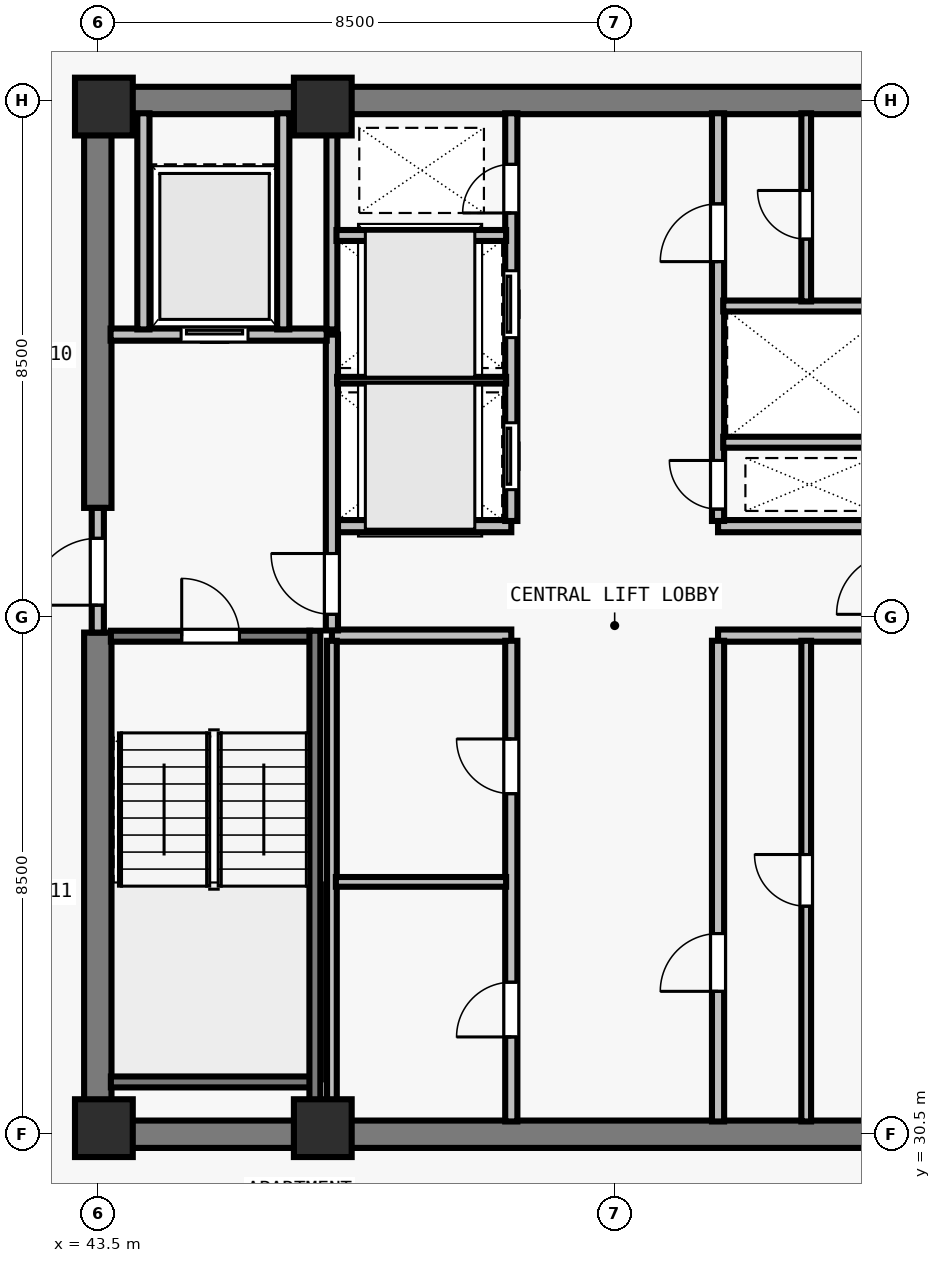
"""IFC4 building model, lengths in metres.
Left out: names, types, materials, properties, quantities, classifications, styles, units other than length and angle.
Written with IfcOpenShell. Run it as: python <this file> out.ifc"""

import sys

from ifc_helpers import new_model, si_unit, direction, frame, frame_2d, origin, origin_2d, place, context, subcontext, project, spatial, rectangle, extrude, element, fill, save


model = new_model("IFC4")
c1 = context("Model", 3, precision=1e-05, world=origin(), true_north=direction((0.0, 1.0)))
c2 = subcontext(c1, "Body", "Model", "MODEL_VIEW")
j1 = project(units=[si_unit("LENGTHUNIT", "METRE"), si_unit("PLANEANGLEUNIT", "RADIAN")], contexts=[c1])
p1 = place(None, origin())
s1 = spatial("IfcSite", under=j1, at=p1, CompositionType="ELEMENT")
p2 = place(p1, origin())
s2 = spatial("IfcBuilding", under=s1, at=p2, CompositionType="ELEMENT")
p3 = place(p2, frame((0.0, 0.0, 216.5)))
s3 = spatial("IfcBuildingStorey", under=s2, at=p3, CompositionType="ELEMENT", Elevation=216.5)
for number, where, z_axis, x_axis in (
    (1, (43.6, 30.6, 0.0), (0.0, 0.0, 1.0), (1.0, 0.0, 0.0)),
    (2, (47.2, 30.6, 0.0), (0.0, 0.0, 1.0), (1.0, 0.0, 0.0)),
    (3, (43.6, 47.4, 0.0), (0.0, 0.0, 1.0), (1.0, 0.0, 0.0)),
    (4, (47.2, 47.4, 0.0), (0.0, 0.0, 1.0), (1.0, 0.0, 0.0)),
):
    element("IfcColumn", number, at=place(p3, frame(where, z_axis=z_axis, x_axis=x_axis)), inside=s3, PredefinedType="COLUMN", context=c2, shape_type="SweptSolid", body=[
        extrude(rectangle(XDim=0.95, YDim=0.95, at=origin_2d()), origin(), (0.0, 0.0, 1.0), 3.5),
    ])
for number, where, z_axis, x_axis in (
    (5, (43.275, 30.5, 0.0), (0.0, 0.0, 1.0), (1.0, 0.0, 0.0)),
    (6, (43.275, 47.5, 0.0), (0.0, 0.0, 1.0), (1.0, 0.0, 0.0)),
):
    element("IfcWall", number, at=place(p3, frame(where, z_axis=z_axis, x_axis=x_axis)), inside=s3, PredefinedType="SHEAR", context=c2, shape_type="SweptSolid", body=[
        extrude(rectangle(XDim=17.45, YDim=0.45, at=frame_2d((8.725, 0.0))), origin(), (0.0, 0.0, 1.0), 3.29),
    ])
p4 = place(p3, frame((43.5, 30.715, 0.0), z_axis=(0.0, 0.0, 1.0), x_axis=(0.0, 1.0, 0.0)))
e7 = element("IfcWall", 7, at=p4, inside=s3, PredefinedType="SHEAR", context=c2, shape_type="SweptSolid", body=[
    extrude(rectangle(XDim=8.035, YDim=0.45, at=frame_2d((4.018, 0.0))), origin(), (0.0, 0.0, 1.0), 3.29),
])
p5 = place(p3, frame((43.5, 40.8, 0.0), z_axis=(0.0, 0.0, 1.0), x_axis=(0.0, 1.0, 0.0)))
e8 = element("IfcWall", 8, at=p5, inside=s3, PredefinedType="SHEAR", context=c2, shape_type="SweptSolid", body=[
    extrude(rectangle(XDim=6.485, YDim=0.45, at=frame_2d((3.242, 0.0))), origin(), (0.0, 0.0, 1.0), 3.29),
])
for number, where, z_axis, x_axis in (
    (9, (47.35, 38.7, 0.0), (0.0, 0.0, 1.0), (1.0, 0.0, 0.0)),
    (10, (47.35, 40.5, 0.0), (0.0, 0.0, 1.0), (1.0, 0.0, 0.0)),
    (11, (53.7, 38.7, 0.0), (0.0, 0.0, 1.0), (1.0, 0.0, 0.0)),
    (12, (53.7, 40.5, 0.0), (0.0, 0.0, 1.0), (1.0, 0.0, 0.0)),
):
    element("IfcWall", number, at=place(p3, frame(where, z_axis=z_axis, x_axis=x_axis)), inside=s3, PredefinedType="SOLIDWALL", context=c2, shape_type="SweptSolid", body=[
        extrude(rectangle(XDim=2.95, YDim=0.2, at=frame_2d((1.475, 0.0))), origin(), (0.0, 0.0, 1.0), 3.29),
    ])
p6 = place(p3, frame((50.3, 30.71, 0.0), z_axis=(0.0, 0.0, 1.0), x_axis=(0.0, 1.0, 0.0)))
e13 = element("IfcWall", 13, at=p6, inside=s3, PredefinedType="SOLIDWALL", context=c2, shape_type="SweptSolid", body=[
    extrude(rectangle(XDim=7.905, YDim=0.2, at=frame_2d((3.953, 0.0))), origin(), (0.0, 0.0, 1.0), 3.29),
])
p7 = place(p6, frame((1.39, 0.0, 0.0)))
e14 = element("IfcOpeningElement", 14, at=p7, cuts=e13, PredefinedType="OPENING", context=c2, shape_type="SweptSolid", body=[
    extrude(rectangle(XDim=0.9, YDim=2.12, at=frame_2d((0.45, 1.06))), frame((0.0, 0.11, 0.0), z_axis=(0.0, -1.0, 0.0), x_axis=(1.0, 0.0, 0.0)), (0.0, 0.0, 1.0), 0.22),
])
p8 = place(p6, frame((5.39, 0.0, 0.0)))
e15 = element("IfcOpeningElement", 15, at=p8, cuts=e13, PredefinedType="OPENING", context=c2, shape_type="SweptSolid", body=[
    extrude(rectangle(XDim=0.9, YDim=2.12, at=frame_2d((0.45, 1.06))), frame((0.0, 0.11, 0.0), z_axis=(0.0, -1.0, 0.0), x_axis=(1.0, 0.0, 0.0)), (0.0, 0.0, 1.0), 0.22),
])
p9 = place(p3, frame((53.7, 30.71, 0.0), z_axis=(0.0, 0.0, 1.0), x_axis=(0.0, 1.0, 0.0)))
e16 = element("IfcWall", 16, at=p9, inside=s3, PredefinedType="SOLIDWALL", context=c2, shape_type="SweptSolid", body=[
    extrude(rectangle(XDim=7.905, YDim=0.2, at=frame_2d((3.953, 0.0))), origin(), (0.0, 0.0, 1.0), 3.29),
])
p10 = place(p9, frame((2.14, 0.0, 0.0)))
e17 = element("IfcOpeningElement", 17, at=p10, cuts=e16, PredefinedType="OPENING", context=c2, shape_type="SweptSolid", body=[
    extrude(rectangle(XDim=0.95, YDim=2.12, at=frame_2d((0.475, 1.06))), frame((0.0, 0.11, 0.0), z_axis=(0.0, -1.0, 0.0), x_axis=(1.0, 0.0, 0.0)), (0.0, 0.0, 1.0), 0.22),
])
p11 = place(p3, frame((50.3, 40.585, 0.0), z_axis=(0.0, 0.0, 1.0), x_axis=(0.0, 1.0, 0.0)))
e18 = element("IfcWall", 18, at=p11, inside=s3, PredefinedType="SOLIDWALL", context=c2, shape_type="SweptSolid", body=[
    extrude(rectangle(XDim=6.705, YDim=0.2, at=frame_2d((3.353, 0.0))), origin(), (0.0, 0.0, 1.0), 3.29),
])
p12 = place(p11, frame((0.515, 0.0, 0.0)))
e19 = element("IfcOpeningElement", 19, at=p12, cuts=e18, PredefinedType="OPENING", context=c2, shape_type="SweptSolid", body=[
    extrude(rectangle(XDim=1.1, YDim=2.2, at=frame_2d((0.55, 1.1))), frame((0.0, 0.11, 0.0), z_axis=(0.0, -1.0, 0.0), x_axis=(1.0, 0.0, 0.0)), (0.0, 0.0, 1.0), 0.22),
])
p13 = place(p11, frame((3.015, 0.0, 0.0)))
e20 = element("IfcOpeningElement", 20, at=p13, cuts=e18, PredefinedType="OPENING", context=c2, shape_type="SweptSolid", body=[
    extrude(rectangle(XDim=1.1, YDim=2.2, at=frame_2d((0.55, 1.1))), frame((0.0, 0.11, 0.0), z_axis=(0.0, -1.0, 0.0), x_axis=(1.0, 0.0, 0.0)), (0.0, 0.0, 1.0), 0.22),
])
p14 = place(p11, frame((5.065, 0.0, 0.0)))
e21 = element("IfcOpeningElement", 21, at=p14, cuts=e18, PredefinedType="OPENING", context=c2, shape_type="SweptSolid", body=[
    extrude(rectangle(XDim=0.8, YDim=2.08, at=frame_2d((0.4, 1.04))), frame((0.0, 0.11, 0.0), z_axis=(0.0, -1.0, 0.0), x_axis=(1.0, 0.0, 0.0)), (0.0, 0.0, 1.0), 0.22),
])
p15 = place(p3, frame((53.7, 40.585, 0.0), z_axis=(0.0, 0.0, 1.0), x_axis=(0.0, 1.0, 0.0)))
e22 = element("IfcWall", 22, at=p15, inside=s3, PredefinedType="SOLIDWALL", context=c2, shape_type="SweptSolid", body=[
    extrude(rectangle(XDim=6.705, YDim=0.2, at=frame_2d((3.353, 0.0))), origin(), (0.0, 0.0, 1.0), 3.29),
])
p16 = place(p15, frame((0.195, 0.0, 0.0)))
e23 = element("IfcOpeningElement", 23, at=p16, cuts=e22, PredefinedType="OPENING", context=c2, shape_type="SweptSolid", body=[
    extrude(rectangle(XDim=0.8, YDim=2.08, at=frame_2d((0.4, 1.04))), frame((0.0, 0.11, 0.0), z_axis=(0.0, -1.0, 0.0), x_axis=(1.0, 0.0, 0.0)), (0.0, 0.0, 1.0), 0.22),
])
p17 = place(p15, frame((4.265, 0.0, 0.0)))
e24 = element("IfcOpeningElement", 24, at=p17, cuts=e22, PredefinedType="OPENING", context=c2, shape_type="SweptSolid", body=[
    extrude(rectangle(XDim=0.95, YDim=2.12, at=frame_2d((0.475, 1.06))), frame((0.0, 0.11, 0.0), z_axis=(0.0, -1.0, 0.0), x_axis=(1.0, 0.0, 0.0)), (0.0, 0.0, 1.0), 0.22),
])
p18 = place(p3, frame((43.5, 38.75, 0.0), z_axis=(0.0, 0.0, 1.0), x_axis=(0.0, 1.0, 0.0)))
e25 = element("IfcWall", 25, at=p18, inside=s3, PredefinedType="SOLIDWALL", context=c2, shape_type="SweptSolid", body=[
    extrude(rectangle(XDim=2.05, YDim=0.2, at=frame_2d((1.025, 0.0))), origin(), (0.0, 0.0, 1.0), 3.29),
])
p19 = place(p18, frame((0.45, 0.0, 0.0)))
e26 = element("IfcOpeningElement", 26, at=p19, cuts=e25, PredefinedType="OPENING", context=c2, shape_type="SweptSolid", body=[
    extrude(rectangle(XDim=1.1, YDim=2.15, at=frame_2d((0.55, 1.075))), frame((0.0, 0.11, 0.0), z_axis=(0.0, -1.0, 0.0), x_axis=(1.0, 0.0, 0.0)), (0.0, 0.0, 1.0), 0.22),
])
p20 = place(p3, frame((47.35, 38.785, 0.0), z_axis=(0.0, 0.0, 1.0), x_axis=(0.0, 1.0, 0.0)))
e27 = element("IfcWall", 27, at=p20, inside=s3, PredefinedType="SOLIDWALL", context=c2, shape_type="SweptSolid", body=[
    extrude(rectangle(XDim=4.865, YDim=0.2, at=frame_2d((2.433, 0.0))), origin(), (0.0, 0.0, 1.0), 3.29),
])
p21 = place(p20, frame((0.265, 0.0, 0.0)))
e28 = element("IfcOpeningElement", 28, at=p21, cuts=e27, PredefinedType="OPENING", context=c2, shape_type="SweptSolid", body=[
    extrude(rectangle(XDim=1.0, YDim=2.15, at=frame_2d((0.5, 1.075))), frame((0.0, 0.11, 0.0), z_axis=(0.0, -1.0, 0.0), x_axis=(1.0, 0.0, 0.0)), (0.0, 0.0, 1.0), 0.22),
])
p22 = place(p3, frame((43.71, 43.65, 0.0), z_axis=(0.0, 0.0, 1.0), x_axis=(1.0, 0.0, 0.0)))
e29 = element("IfcWall", 29, at=p22, inside=s3, PredefinedType="SOLIDWALL", context=c2, shape_type="SweptSolid", body=[
    extrude(rectangle(XDim=3.555, YDim=0.2, at=frame_2d((1.777, 0.0))), origin(), (0.0, 0.0, 1.0), 3.29),
])
p23 = place(p22, frame((1.16, 0.0, 0.0)))
e30 = element("IfcOpeningElement", 30, at=p23, cuts=e29, PredefinedType="OPENING", context=c2, shape_type="SweptSolid", body=[
    extrude(rectangle(XDim=1.1, YDim=2.2, at=frame_2d((0.55, 1.1))), frame((0.0, 0.11, 0.0), z_axis=(0.0, -1.0, 0.0), x_axis=(1.0, 0.0, 0.0)), (0.0, 0.0, 1.0), 0.22),
])
for number, where, z_axis, x_axis in (
    (31, (46.55, 43.735, 0.0), (0.0, 0.0, 1.0), (0.0, 1.0, 0.0)),
    (32, (44.25, 43.735, 0.0), (0.0, 0.0, 1.0), (0.0, 1.0, 0.0)),
):
    element("IfcWall", number, at=place(p3, frame(where, z_axis=z_axis, x_axis=x_axis)), inside=s3, PredefinedType="SOLIDWALL", context=c2, shape_type="SweptSolid", body=[
        extrude(rectangle(XDim=3.555, YDim=0.2, at=frame_2d((1.777, 0.0))), origin(), (0.0, 0.0, 1.0), 3.29),
    ])
p24 = place(p3, frame((47.35, 30.71, 0.0), z_axis=(0.0, 0.0, 1.0), x_axis=(0.0, 1.0, 0.0)))
e33 = element("IfcWall", 33, at=p24, inside=s3, PredefinedType="PARTITIONING", context=c2, shape_type="SweptSolid", body=[
    extrude(rectangle(XDim=7.905, YDim=0.16, at=frame_2d((3.953, 0.0))), origin(), (0.0, 0.0, 1.0), 3.29),
])
p25 = place(p3, frame((47.415, 34.65, 0.0), z_axis=(0.0, 0.0, 1.0), x_axis=(1.0, 0.0, 0.0)))
e34 = element("IfcWall", 34, at=p25, inside=s3, PredefinedType="PARTITIONING", context=c2, shape_type="SweptSolid", body=[
    extrude(rectangle(XDim=2.8, YDim=0.16, at=frame_2d((1.4, 0.0))), origin(), (0.0, 0.0, 1.0), 3.29),
])
p26 = place(p3, frame((55.15, 30.71, 0.0), z_axis=(0.0, 0.0, 1.0), x_axis=(0.0, 1.0, 0.0)))
e35 = element("IfcWall", 35, at=p26, inside=s3, PredefinedType="PARTITIONING", context=c2, shape_type="SweptSolid", body=[
    extrude(rectangle(XDim=7.905, YDim=0.16, at=frame_2d((3.953, 0.0))), origin(), (0.0, 0.0, 1.0), 3.29),
])
p27 = place(p26, frame((3.54, 0.0, 0.0)))
e36 = element("IfcOpeningElement", 36, at=p27, cuts=e35, PredefinedType="OPENING", context=c2, shape_type="SweptSolid", body=[
    extrude(rectangle(XDim=0.85, YDim=2.12, at=frame_2d((0.425, 1.06))), frame((0.0, 0.09, 0.0), z_axis=(0.0, -1.0, 0.0), x_axis=(1.0, 0.0, 0.0)), (0.0, 0.0, 1.0), 0.18),
])
p28 = place(p3, frame((47.35, 43.735, 0.0), z_axis=(0.0, 0.0, 1.0), x_axis=(0.0, 1.0, 0.0)))
e37 = element("IfcWall", 37, at=p28, inside=s3, PredefinedType="SOLIDWALL", context=c2, shape_type="SweptSolid", body=[
    extrude(rectangle(XDim=3.555, YDim=0.18, at=frame_2d((1.777, 0.0))), origin(), (0.0, 0.0, 1.0), 3.29),
])
p29 = place(p3, frame((47.435, 42.9, 0.0), z_axis=(0.0, 0.0, 1.0), x_axis=(1.0, 0.0, 0.0)))
e38 = element("IfcWall", 38, at=p29, inside=s3, PredefinedType="PARTITIONING", context=c2, shape_type="SweptSolid", body=[
    extrude(rectangle(XDim=2.78, YDim=0.11, at=frame_2d((1.39, 0.0))), origin(), (0.0, 0.0, 1.0), 3.29),
])
p30 = place(p3, frame((47.425, 45.28, 0.0), z_axis=(0.0, 0.0, 1.0), x_axis=(1.0, 0.0, 0.0)))
e39 = element("IfcWall", 39, at=p30, inside=s3, PredefinedType="SOLIDWALL", context=c2, shape_type="SweptSolid", body=[
    extrude(rectangle(XDim=2.79, YDim=0.18, at=frame_2d((1.395, 0.0))), origin(), (0.0, 0.0, 1.0), 3.29),
])
p31 = place(p3, frame((53.785, 41.88, 0.0), z_axis=(0.0, 0.0, 1.0), x_axis=(1.0, 0.0, 0.0)))
e40 = element("IfcWall", 40, at=p31, inside=s3, PredefinedType="SOLIDWALL", context=c2, shape_type="SweptSolid", body=[
    extrude(rectangle(XDim=2.78, YDim=0.18, at=frame_2d((1.39, 0.0))), origin(), (0.0, 0.0, 1.0), 3.29),
])
p32 = place(p3, frame((53.785, 44.12, 0.0), z_axis=(0.0, 0.0, 1.0), x_axis=(1.0, 0.0, 0.0)))
e41 = element("IfcWall", 41, at=p32, inside=s3, PredefinedType="SOLIDWALL", context=c2, shape_type="SweptSolid", body=[
    extrude(rectangle(XDim=2.79, YDim=0.18, at=frame_2d((1.395, 0.0))), origin(), (0.0, 0.0, 1.0), 3.29),
])
p33 = place(p3, frame((55.15, 44.195, 0.0), z_axis=(0.0, 0.0, 1.0), x_axis=(0.0, 1.0, 0.0)))
e42 = element("IfcWall", 42, at=p33, inside=s3, PredefinedType="PARTITIONING", context=c2, shape_type="SweptSolid", body=[
    extrude(rectangle(XDim=3.095, YDim=0.16, at=frame_2d((1.547, 0.0))), origin(), (0.0, 0.0, 1.0), 3.29),
])
p34 = place(p33, frame((1.025, 0.0, 0.0)))
e43 = element("IfcOpeningElement", 43, at=p34, cuts=e42, PredefinedType="OPENING", context=c2, shape_type="SweptSolid", body=[
    extrude(rectangle(XDim=0.8, YDim=2.1, at=frame_2d((0.4, 1.05))), frame((0.0, 0.09, 0.0), z_axis=(0.0, -1.0, 0.0), x_axis=(1.0, 0.0, 0.0)), (0.0, 0.0, 1.0), 0.18),
])
p35 = place(p3, frame((43.715, 38.69, 0.0), z_axis=(0.0, 0.0, 1.0), x_axis=(1.0, 0.0, 0.0)))
e44 = element("IfcWall", 44, at=p35, inside=s3, PredefinedType="SOLIDWALL", context=c2, shape_type="SweptSolid", body=[
    extrude(rectangle(XDim=3.28, YDim=0.18, at=frame_2d((1.64, 0.0))), origin(), (0.0, 0.0, 1.0), 3.29),
])
p36 = place(p35, frame((1.165, 0.0, 0.0)))
e45 = element("IfcOpeningElement", 45, at=p36, cuts=e44, PredefinedType="OPENING", context=c2, shape_type="SweptSolid", body=[
    extrude(rectangle(XDim=0.95, YDim=2.15, at=frame_2d((0.475, 1.075))), frame((0.0, 0.1, 0.0), z_axis=(0.0, -1.0, 0.0), x_axis=(1.0, 0.0, 0.0)), (0.0, 0.0, 1.0), 0.2),
])
p37 = place(p3, frame((43.715, 31.36, 0.0), z_axis=(0.0, 0.0, 1.0), x_axis=(1.0, 0.0, 0.0)))
e46 = element("IfcWall", 46, at=p37, inside=s3, PredefinedType="SOLIDWALL", context=c2, shape_type="SweptSolid", body=[
    extrude(rectangle(XDim=3.28, YDim=0.18, at=frame_2d((1.64, 0.0))), origin(), (0.0, 0.0, 1.0), 3.29),
])
p38 = place(p3, frame((47.07, 38.78, 0.0), z_axis=(0.0, 0.0, 1.0), x_axis=(0.0, -1.0, 0.0)))
e47 = element("IfcWall", 47, at=p38, inside=s3, PredefinedType="SOLIDWALL", context=c2, shape_type="SweptSolid", body=[
    extrude(rectangle(XDim=8.067, YDim=0.18, at=frame_2d((4.034, 0.0))), origin(), (0.0, 0.0, 1.0), 3.29),
])
p39 = place(p19, origin())
e48 = element("IfcDoor", 48, at=p39, inside=s3, OperationType="SINGLE_SWING_LEFT", PredefinedType="DOOR", context=c2, shape_type="SweptSolid", body=[
    extrude(rectangle(XDim=1.1, YDim=2.15, at=frame_2d((0.55, 1.075))), frame((0.0, 0.025, 0.0), z_axis=(0.0, -1.0, 0.0), x_axis=(1.0, 0.0, 0.0)), (0.0, 0.0, 1.0), 0.05),
])
fill(e26, e48)
p40 = place(p21, origin())
e49 = element("IfcDoor", 49, at=p40, inside=s3, OperationType="SINGLE_SWING_RIGHT", PredefinedType="DOOR", context=c2, shape_type="SweptSolid", body=[
    extrude(rectangle(XDim=1.0, YDim=2.15, at=frame_2d((0.5, 1.075))), frame((0.0, 0.025, 0.0), z_axis=(0.0, -1.0, 0.0), x_axis=(1.0, 0.0, 0.0)), (0.0, 0.0, 1.0), 0.05),
])
fill(e28, e49)
p41 = place(p23, origin())
e50 = element("IfcDoor", 50, at=p41, inside=s3, OperationType="SLIDING_TO_LEFT", PredefinedType="DOOR", context=c2, shape_type="SweptSolid", body=[
    extrude(rectangle(XDim=1.1, YDim=2.2, at=frame_2d((0.55, 1.1))), frame((0.0, 0.025, 0.0), z_axis=(0.0, -1.0, 0.0), x_axis=(1.0, 0.0, 0.0)), (0.0, 0.0, 1.0), 0.05),
])
fill(e30, e50)
p42 = place(p7, origin())
e51 = element("IfcDoor", 51, at=p42, inside=s3, OperationType="SINGLE_SWING_LEFT", PredefinedType="DOOR", context=c2, shape_type="SweptSolid", body=[
    extrude(rectangle(XDim=0.9, YDim=2.12, at=frame_2d((0.45, 1.06))), frame((0.0, 0.025, 0.0), z_axis=(0.0, -1.0, 0.0), x_axis=(1.0, 0.0, 0.0)), (0.0, 0.0, 1.0), 0.05),
])
fill(e14, e51)
p43 = place(p8, origin())
e52 = element("IfcDoor", 52, at=p43, inside=s3, OperationType="SINGLE_SWING_RIGHT", PredefinedType="DOOR", context=c2, shape_type="SweptSolid", body=[
    extrude(rectangle(XDim=0.9, YDim=2.12, at=frame_2d((0.45, 1.06))), frame((0.0, 0.025, 0.0), z_axis=(0.0, -1.0, 0.0), x_axis=(1.0, 0.0, 0.0)), (0.0, 0.0, 1.0), 0.05),
])
fill(e15, e52)
p44 = place(p10, origin())
e53 = element("IfcDoor", 53, at=p44, inside=s3, OperationType="SINGLE_SWING_LEFT", PredefinedType="DOOR", context=c2, shape_type="SweptSolid", body=[
    extrude(rectangle(XDim=0.95, YDim=2.12, at=frame_2d((0.475, 1.06))), frame((0.0, 0.025, 0.0), z_axis=(0.0, -1.0, 0.0), x_axis=(1.0, 0.0, 0.0)), (0.0, 0.0, 1.0), 0.05),
])
fill(e17, e53)
p45 = place(p27, origin())
e54 = element("IfcDoor", 54, at=p45, inside=s3, OperationType="SINGLE_SWING_RIGHT", PredefinedType="DOOR", context=c2, shape_type="SweptSolid", body=[
    extrude(rectangle(XDim=0.85, YDim=2.12, at=frame_2d((0.425, 1.06))), frame((0.0, 0.025, 0.0), z_axis=(0.0, -1.0, 0.0), x_axis=(1.0, 0.0, 0.0)), (0.0, 0.0, 1.0), 0.05),
])
fill(e36, e54)
p46 = place(p12, origin())
e55 = element("IfcDoor", 55, at=p46, inside=s3, OperationType="SLIDING_TO_LEFT", PredefinedType="DOOR", context=c2, shape_type="SweptSolid", body=[
    extrude(rectangle(XDim=1.1, YDim=2.2, at=frame_2d((0.55, 1.1))), frame((0.0, 0.025, 0.0), z_axis=(0.0, -1.0, 0.0), x_axis=(1.0, 0.0, 0.0)), (0.0, 0.0, 1.0), 0.05),
])
fill(e19, e55)
p47 = place(p13, origin())
e56 = element("IfcDoor", 56, at=p47, inside=s3, OperationType="SLIDING_TO_LEFT", PredefinedType="DOOR", context=c2, shape_type="SweptSolid", body=[
    extrude(rectangle(XDim=1.1, YDim=2.2, at=frame_2d((0.55, 1.1))), frame((0.0, 0.025, 0.0), z_axis=(0.0, -1.0, 0.0), x_axis=(1.0, 0.0, 0.0)), (0.0, 0.0, 1.0), 0.05),
])
fill(e20, e56)
p48 = place(p14, origin())
e57 = element("IfcDoor", 57, at=p48, inside=s3, OperationType="SINGLE_SWING_LEFT", PredefinedType="DOOR", context=c2, shape_type="SweptSolid", body=[
    extrude(rectangle(XDim=0.8, YDim=2.08, at=frame_2d((0.4, 1.04))), frame((0.0, 0.025, 0.0), z_axis=(0.0, -1.0, 0.0), x_axis=(1.0, 0.0, 0.0)), (0.0, 0.0, 1.0), 0.05),
])
fill(e21, e57)
p49 = place(p16, origin())
e58 = element("IfcDoor", 58, at=p49, inside=s3, OperationType="SINGLE_SWING_RIGHT", PredefinedType="DOOR", context=c2, shape_type="SweptSolid", body=[
    extrude(rectangle(XDim=0.8, YDim=2.08, at=frame_2d((0.4, 1.04))), frame((0.0, 0.025, 0.0), z_axis=(0.0, -1.0, 0.0), x_axis=(1.0, 0.0, 0.0)), (0.0, 0.0, 1.0), 0.05),
])
fill(e23, e58)
p50 = place(p17, origin())
e59 = element("IfcDoor", 59, at=p50, inside=s3, OperationType="SINGLE_SWING_LEFT", PredefinedType="DOOR", context=c2, shape_type="SweptSolid", body=[
    extrude(rectangle(XDim=0.95, YDim=2.12, at=frame_2d((0.475, 1.06))), frame((0.0, 0.025, 0.0), z_axis=(0.0, -1.0, 0.0), x_axis=(1.0, 0.0, 0.0)), (0.0, 0.0, 1.0), 0.05),
])
fill(e24, e59)
p51 = place(p34, origin())
e60 = element("IfcDoor", 60, at=p51, inside=s3, OperationType="SINGLE_SWING_RIGHT", PredefinedType="DOOR", context=c2, shape_type="SweptSolid", body=[
    extrude(rectangle(XDim=0.8, YDim=2.1, at=frame_2d((0.4, 1.05))), frame((0.0, 0.025, 0.0), z_axis=(0.0, -1.0, 0.0), x_axis=(1.0, 0.0, 0.0)), (0.0, 0.0, 1.0), 0.05),
])
fill(e43, e60)
p52 = place(p36, origin())
e61 = element("IfcDoor", 61, at=p52, inside=s3, OperationType="SINGLE_SWING_LEFT", PredefinedType="DOOR", context=c2, shape_type="SweptSolid", body=[
    extrude(rectangle(XDim=0.95, YDim=2.15, at=frame_2d((0.475, 1.075))), frame((0.0, 0.025, 0.0), z_axis=(0.0, -1.0, 0.0), x_axis=(1.0, 0.0, 0.0)), (0.0, 0.0, 1.0), 0.05),
])
fill(e45, e61)
save(model, sys.argv[1])
